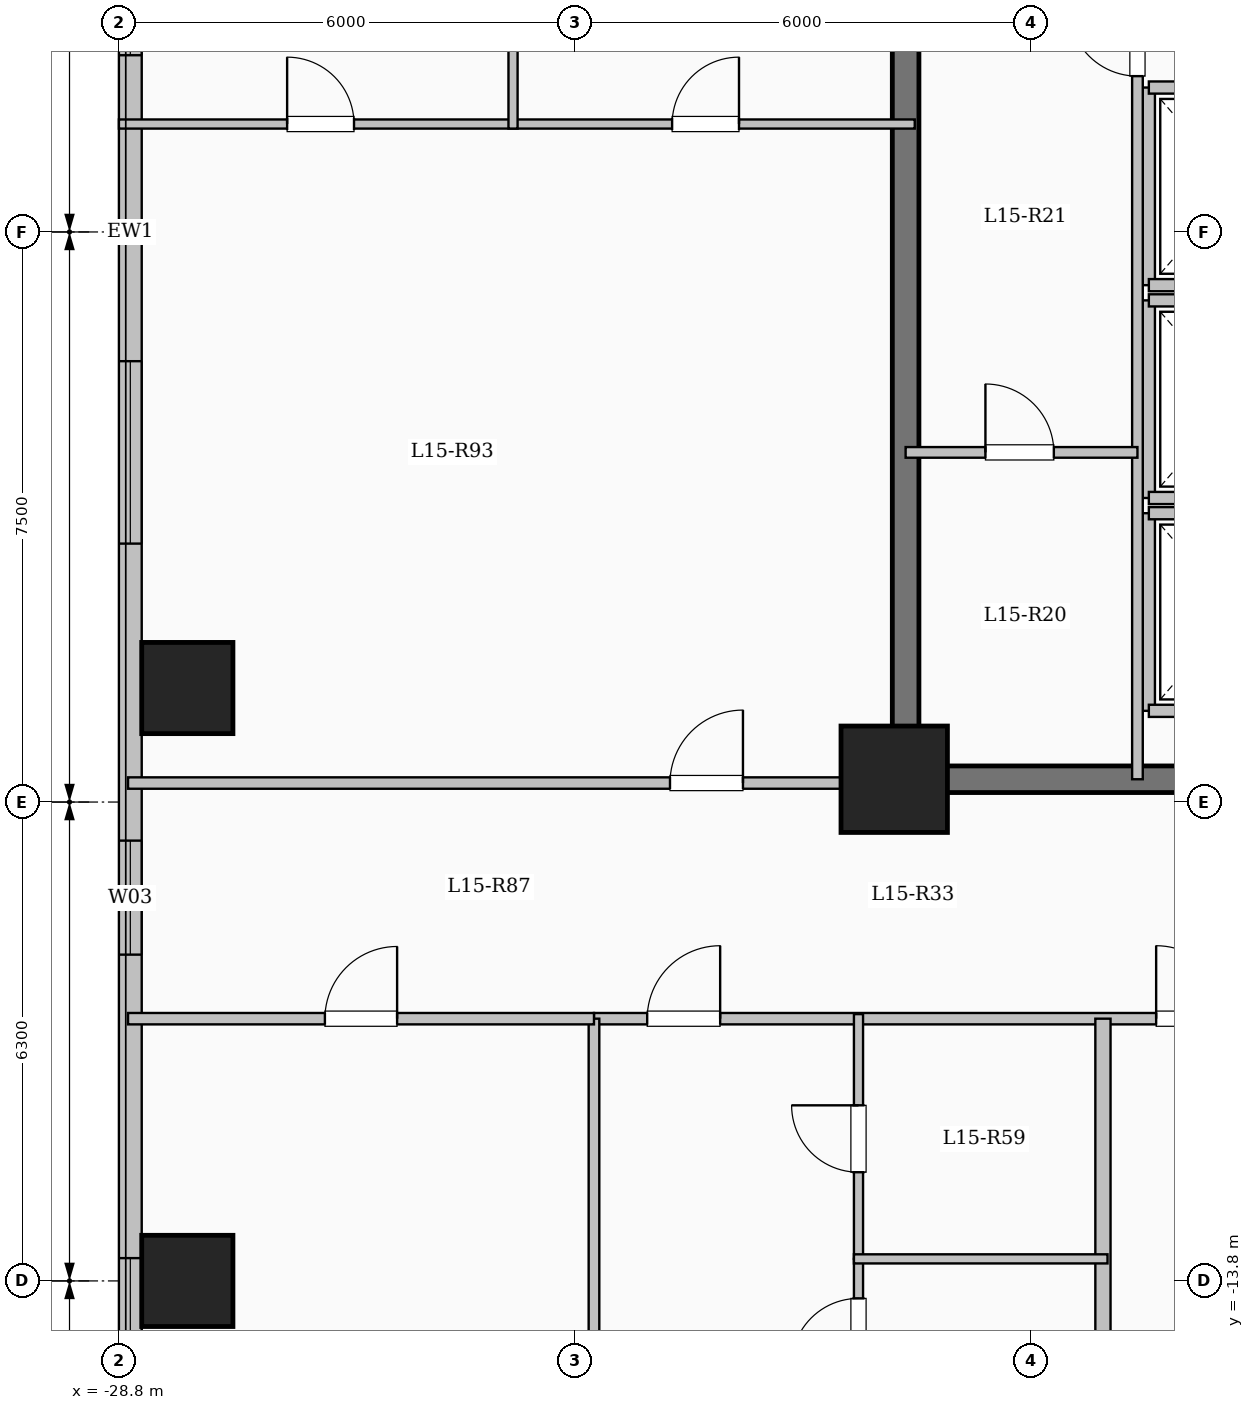
"""IFC4 building model, lengths in metres.
Left out: names, types, materials, properties, quantities, classifications, styles, units other than length and angle.
Written with IfcOpenShell. Run it as: python <this file> out.ifc"""

import sys

from ifc_helpers import new_model, si_unit, direction, frame, frame_2d, origin, origin_2d, place, context, subcontext, project, spatial, rectangle, extrude, element, fill, save


model = new_model("IFC4")
c1 = context("Model", 3, precision=1e-05, world=origin(), true_north=direction((0.0, 1.0)))
c2 = subcontext(c1, "Body", "Model", "MODEL_VIEW")
j1 = project(units=[si_unit("LENGTHUNIT", "METRE"), si_unit("PLANEANGLEUNIT", "RADIAN")], contexts=[c1])
p1 = place(None, origin())
s1 = spatial("IfcSite", under=j1, at=p1, CompositionType="ELEMENT")
p2 = place(p1, origin())
s2 = spatial("IfcBuilding", under=s1, at=p2, CompositionType="ELEMENT")
p3 = place(p2, frame((0.0, 0.0, 57.5)))
s3 = spatial("IfcBuildingStorey", under=s2, at=p3, CompositionType="ELEMENT", Elevation=57.5)
p4 = place(p3, frame((-18.6, -7.2, 0.0), z_axis=(0.0, 0.0, 1.0), x_axis=(1.0, 0.0, 0.0)))
e1 = element("IfcColumn", 1, at=p4, inside=s3, PredefinedType="COLUMN", context=c2, shape_type="SweptSolid", body=[
    extrude(rectangle(XDim=1.4, YDim=1.4, at=origin_2d()), origin(), (0.0, 0.0, 1.0), 3.35),
])
for number, where, z_axis, x_axis in (
    (2, (-27.9, -13.8, 0.0), (0.0, 0.0, 1.0), (1.0, 0.0, 0.0)),
    (3, (-27.9, -6.0, 0.0), (0.0, 0.0, 1.0), (1.0, 0.0, 0.0)),
):
    element("IfcColumn", number, at=place(p3, frame(where, z_axis=z_axis, x_axis=x_axis)), inside=s3, PredefinedType="COLUMN", context=c2, shape_type="SweptSolid", body=[
        extrude(rectangle(XDim=1.2, YDim=1.2, at=origin_2d()), origin(), (0.0, 0.0, 1.0), 3.35),
    ])
p5 = place(p3, frame((-28.65, -19.05, 0.0), z_axis=(0.0, 0.0, 1.0), x_axis=(0.0, 1.0, 0.0)))
e4 = element("IfcWall", 4, at=p5, inside=s3, PredefinedType="SOLIDWALL", context=c2, shape_type="SweptSolid", body=[
    extrude(rectangle(XDim=38.1, YDim=0.3, at=frame_2d((19.05, 0.0))), origin(), (0.0, 0.0, 1.0), 3.1),
])
p6 = place(p5, frame((3.15, 0.0, 0.9)))
e5 = element("IfcOpeningElement", 5, at=p6, cuts=e4, PredefinedType="OPENING", context=c2, shape_type="SweptSolid", body=[
    extrude(rectangle(XDim=2.4, YDim=1.8, at=frame_2d((1.2, 0.9))), frame((0.0, 0.16, 0.0), z_axis=(0.0, -1.0, 0.0), x_axis=(1.0, 0.0, 0.0)), (0.0, 0.0, 1.0), 0.32),
])
p7 = place(p5, frame((9.542, 0.0, 0.9)))
e6 = element("IfcOpeningElement", 6, at=p7, cuts=e4, PredefinedType="OPENING", context=c2, shape_type="SweptSolid", body=[
    extrude(rectangle(XDim=1.5, YDim=1.65, at=frame_2d((0.75, 0.825))), frame((0.0, 0.16, 0.0), z_axis=(0.0, -1.0, 0.0), x_axis=(1.0, 0.0, 0.0)), (0.0, 0.0, 1.0), 0.32),
])
p8 = place(p5, frame((14.95, 0.0, 0.9)))
e7 = element("IfcOpeningElement", 7, at=p8, cuts=e4, PredefinedType="OPENING", context=c2, shape_type="SweptSolid", body=[
    extrude(rectangle(XDim=2.4, YDim=1.8, at=frame_2d((1.2, 0.9))), frame((0.0, 0.16, 0.0), z_axis=(0.0, -1.0, 0.0), x_axis=(1.0, 0.0, 0.0)), (0.0, 0.0, 1.0), 0.32),
])
p9 = place(p5, frame((21.375, 0.0, 0.9)))
e8 = element("IfcOpeningElement", 8, at=p9, cuts=e4, PredefinedType="OPENING", context=c2, shape_type="SweptSolid", body=[
    extrude(rectangle(XDim=1.8, YDim=1.65, at=frame_2d((0.9, 0.825))), frame((0.0, 0.16, 0.0), z_axis=(0.0, -1.0, 0.0), x_axis=(1.0, 0.0, 0.0)), (0.0, 0.0, 1.0), 0.32),
])
p10 = place(p5, frame((25.925, 0.0, 0.9)))
e9 = element("IfcOpeningElement", 9, at=p10, cuts=e4, PredefinedType="OPENING", context=c2, shape_type="SweptSolid", body=[
    extrude(rectangle(XDim=2.0, YDim=1.7, at=frame_2d((1.0, 0.85))), frame((0.0, 0.16, 0.0), z_axis=(0.0, -1.0, 0.0), x_axis=(1.0, 0.0, 0.0)), (0.0, 0.0, 1.0), 0.32),
])
p11 = place(p5, frame((30.175, 0.0, 0.95)))
e10 = element("IfcOpeningElement", 10, at=p11, cuts=e4, PredefinedType="OPENING", context=c2, shape_type="SweptSolid", body=[
    extrude(rectangle(XDim=1.0, YDim=1.5, at=frame_2d((0.5, 0.75))), frame((0.0, 0.16, 0.0), z_axis=(0.0, -1.0, 0.0), x_axis=(1.0, 0.0, 0.0)), (0.0, 0.0, 1.0), 0.32),
])
p12 = place(p5, frame((33.85, 0.0, 0.9)))
e11 = element("IfcOpeningElement", 11, at=p12, cuts=e4, PredefinedType="OPENING", context=c2, shape_type="SweptSolid", body=[
    extrude(rectangle(XDim=2.0, YDim=1.7, at=frame_2d((1.0, 0.85))), frame((0.0, 0.16, 0.0), z_axis=(0.0, -1.0, 0.0), x_axis=(1.0, 0.0, 0.0)), (0.0, 0.0, 1.0), 0.32),
])
p13 = place(p3, frame((-15.25, -6.3, 0.0), z_axis=(0.0, 0.0, 1.0), x_axis=(0.0, 1.0, 0.0)))
e12 = element("IfcWall", 12, at=p13, inside=s3, PredefinedType="SOLIDWALL", context=c2, shape_type="SweptSolid", body=[
    extrude(rectangle(XDim=2.6, YDim=0.16, at=frame_2d((1.3, 0.0))), origin(), (0.0, 0.0, 1.0), 3.1),
])
for number, where, z_axis, x_axis in (
    (13, (-15.25, -6.3, 0.0), (0.0, 0.0, 1.0), (1.0, 0.0, 0.0)),
    (14, (-15.25, -3.7, 0.0), (0.0, 0.0, 1.0), (1.0, 0.0, 0.0)),
):
    element("IfcWall", number, at=place(p3, frame(where, z_axis=z_axis, x_axis=x_axis)), inside=s3, PredefinedType="SOLIDWALL", context=c2, shape_type="SweptSolid", body=[
        extrude(rectangle(XDim=2.3, YDim=0.16, at=frame_2d((1.15, 0.0))), origin(), (0.0, 0.0, 1.0), 3.1),
    ])
p14 = place(p3, frame((-15.25, -3.5, 0.0), z_axis=(0.0, 0.0, 1.0), x_axis=(0.0, 1.0, 0.0)))
e15 = element("IfcWall", 15, at=p14, inside=s3, PredefinedType="SOLIDWALL", context=c2, shape_type="SweptSolid", body=[
    extrude(rectangle(XDim=2.6, YDim=0.16, at=frame_2d((1.3, 0.0))), origin(), (0.0, 0.0, 1.0), 3.1),
])
for number, where, z_axis, x_axis in (
    (16, (-15.25, -3.5, 0.0), (0.0, 0.0, 1.0), (1.0, 0.0, 0.0)),
    (17, (-15.25, -0.9, 0.0), (0.0, 0.0, 1.0), (1.0, 0.0, 0.0)),
):
    element("IfcWall", number, at=place(p3, frame(where, z_axis=z_axis, x_axis=x_axis)), inside=s3, PredefinedType="SOLIDWALL", context=c2, shape_type="SweptSolid", body=[
        extrude(rectangle(XDim=2.3, YDim=0.16, at=frame_2d((1.15, 0.0))), origin(), (0.0, 0.0, 1.0), 3.1),
    ])
p15 = place(p3, frame((-15.25, -0.7, 0.0), z_axis=(0.0, 0.0, 1.0), x_axis=(0.0, 1.0, 0.0)))
e18 = element("IfcWall", 18, at=p15, inside=s3, PredefinedType="SOLIDWALL", context=c2, shape_type="SweptSolid", body=[
    extrude(rectangle(XDim=2.6, YDim=0.16, at=frame_2d((1.3, 0.0))), origin(), (0.0, 0.0, 1.0), 3.1),
])
for number, where, z_axis, x_axis in (
    (19, (-15.25, -0.7, 0.0), (0.0, 0.0, 1.0), (1.0, 0.0, 0.0)),
    (20, (-15.25, 1.9, 0.0), (0.0, 0.0, 1.0), (1.0, 0.0, 0.0)),
):
    element("IfcWall", number, at=place(p3, frame(where, z_axis=z_axis, x_axis=x_axis)), inside=s3, PredefinedType="SOLIDWALL", context=c2, shape_type="SweptSolid", body=[
        extrude(rectangle(XDim=2.3, YDim=0.16, at=frame_2d((1.15, 0.0))), origin(), (0.0, 0.0, 1.0), 3.1),
    ])
p16 = place(p3, frame((-18.45, -7.375, 0.0), z_axis=(0.0, 0.0, 1.0), x_axis=(0.0, 1.0, 0.0)))
e21 = element("IfcWall", 21, at=p16, inside=s3, PredefinedType="SHEAR", context=c2, shape_type="SweptSolid", body=[
    extrude(rectangle(XDim=14.05, YDim=0.35, at=frame_2d((7.025, 0.0))), origin(), (0.0, 0.0, 1.0), 3.35),
])
p17 = place(p3, frame((-18.625, -7.2, 0.0), z_axis=(0.0, 0.0, 1.0), x_axis=(1.0, 0.0, 0.0)))
e22 = element("IfcWall", 22, at=p17, inside=s3, PredefinedType="SHEAR", context=c2, shape_type="SweptSolid", body=[
    extrude(rectangle(XDim=8.55, YDim=0.35, at=frame_2d((4.275, 0.0))), origin(), (0.0, 0.0, 1.0), 3.35),
])
p18 = place(p3, frame((-15.4, -7.2, 0.0), z_axis=(0.0, 0.0, 1.0), x_axis=(0.0, 1.0, 0.0)))
e23 = element("IfcWall", 23, at=p18, inside=s3, PredefinedType="PARTITIONING", context=c2, shape_type="SweptSolid", body=[
    extrude(rectangle(XDim=10.45, YDim=0.14, at=frame_2d((5.225, 0.0))), origin(), (0.0, 0.0, 1.0), 3.1),
])
p19 = place(p18, frame((9.25, 0.0, 0.0)))
e24 = element("IfcOpeningElement", 24, at=p19, cuts=e23, PredefinedType="OPENING", context=c2, shape_type="SweptSolid", body=[
    extrude(rectangle(XDim=0.9, YDim=2.08, at=frame_2d((0.45, 1.04))), frame((0.0, 0.08, 0.0), z_axis=(0.0, -1.0, 0.0), x_axis=(1.0, 0.0, 0.0)), (0.0, 0.0, 1.0), 0.16),
])
p20 = place(p3, frame((-18.45, -2.9, 0.0), z_axis=(0.0, 0.0, 1.0), x_axis=(1.0, 0.0, 0.0)))
e25 = element("IfcWall", 25, at=p20, inside=s3, PredefinedType="PARTITIONING", context=c2, shape_type="SweptSolid", body=[
    extrude(rectangle(XDim=3.05, YDim=0.14, at=frame_2d((1.525, 0.0))), origin(), (0.0, 0.0, 1.0), 3.1),
])
p21 = place(p20, frame((1.05, 0.0, 0.0)))
e26 = element("IfcOpeningElement", 26, at=p21, cuts=e25, PredefinedType="OPENING", context=c2, shape_type="SweptSolid", body=[
    extrude(rectangle(XDim=0.9, YDim=2.08, at=frame_2d((0.45, 1.04))), frame((0.0, 0.08, 0.0), z_axis=(0.0, -1.0, 0.0), x_axis=(1.0, 0.0, 0.0)), (0.0, 0.0, 1.0), 0.16),
])
p22 = place(p3, frame((-22.55, -10.35, 0.0), z_axis=(0.0, 0.0, 1.0), x_axis=(1.0, 0.0, 0.0)))
e27 = element("IfcWall", 27, at=p22, inside=s3, PredefinedType="PARTITIONING", context=c2, shape_type="SweptSolid", body=[
    extrude(rectangle(XDim=14.0, YDim=0.15, at=frame_2d((7.0, 0.0))), origin(), (0.0, 0.0, 1.0), 3.1),
])
p23 = place(p22, frame((0.7, 0.0, 0.0)))
e28 = element("IfcOpeningElement", 28, at=p23, cuts=e27, PredefinedType="OPENING", context=c2, shape_type="SweptSolid", body=[
    extrude(rectangle(XDim=0.96, YDim=2.15, at=frame_2d((0.48, 1.075))), frame((0.0, 0.085, 0.0), z_axis=(0.0, -1.0, 0.0), x_axis=(1.0, 0.0, 0.0)), (0.0, 0.0, 1.0), 0.17),
])
p24 = place(p22, frame((7.396, 0.0, 0.0)))
e29 = element("IfcOpeningElement", 29, at=p24, cuts=e27, PredefinedType="OPENING", context=c2, shape_type="SweptSolid", body=[
    extrude(rectangle(XDim=0.96, YDim=2.15, at=frame_2d((0.48, 1.075))), frame((0.0, 0.085, 0.0), z_axis=(0.0, -1.0, 0.0), x_axis=(1.0, 0.0, 0.0)), (0.0, 0.0, 1.0), 0.17),
])
p25 = place(p3, frame((-15.854, -23.6, 0.0), z_axis=(0.0, 0.0, 1.0), x_axis=(0.0, 1.0, 0.0)))
e30 = element("IfcWall", 30, at=p25, inside=s3, PredefinedType="SOLIDWALL", context=c2, shape_type="SweptSolid", body=[
    extrude(rectangle(XDim=13.25, YDim=0.2, at=frame_2d((6.625, 0.0))), origin(), (0.0, 0.0, 1.0), 3.1),
])
p26 = place(p3, frame((-19.07, -23.6, 0.0), z_axis=(0.0, 0.0, 1.0), x_axis=(0.0, 1.0, 0.0)))
e31 = element("IfcWall", 31, at=p26, inside=s3, PredefinedType="PARTITIONING", context=c2, shape_type="SweptSolid", body=[
    extrude(rectangle(XDim=10.09, YDim=0.12, at=frame_2d((5.045, 0.0))), origin(), (0.0, 0.0, 1.0), 3.1),
])
p27 = place(p26, frame((8.69, 0.0, 0.0)))
e32 = element("IfcOpeningElement", 32, at=p27, cuts=e31, PredefinedType="OPENING", context=c2, shape_type="SweptSolid", body=[
    extrude(rectangle(XDim=0.88, YDim=2.1, at=frame_2d((0.44, 1.05))), frame((0.0, 0.07, 0.0), z_axis=(0.0, -1.0, 0.0), x_axis=(1.0, 0.0, 0.0)), (0.0, 0.0, 1.0), 0.14),
])
p28 = place(p3, frame((-19.07, -13.51, 0.0), z_axis=(0.0, 0.0, 1.0), x_axis=(0.0, 1.0, 0.0)))
e33 = element("IfcWall", 33, at=p28, inside=s3, PredefinedType="PARTITIONING", context=c2, shape_type="SweptSolid", body=[
    extrude(rectangle(XDim=3.22, YDim=0.12, at=frame_2d((1.61, 0.0))), origin(), (0.0, 0.0, 1.0), 3.1),
])
p29 = place(p28, frame((1.14, 0.0, 0.0)))
e34 = element("IfcOpeningElement", 34, at=p29, cuts=e33, PredefinedType="OPENING", context=c2, shape_type="SweptSolid", body=[
    extrude(rectangle(XDim=0.88, YDim=2.1, at=frame_2d((0.44, 1.05))), frame((0.0, 0.07, 0.0), z_axis=(0.0, -1.0, 0.0), x_axis=(1.0, 0.0, 0.0)), (0.0, 0.0, 1.0), 0.14),
])
p30 = place(p3, frame((-19.13, -13.51, 0.0), z_axis=(0.0, 0.0, 1.0), x_axis=(1.0, 0.0, 0.0)))
e35 = element("IfcWall", 35, at=p30, inside=s3, PredefinedType="PARTITIONING", context=c2, shape_type="SweptSolid", body=[
    extrude(rectangle(XDim=3.336, YDim=0.12, at=frame_2d((1.668, 0.0))), origin(), (0.0, 0.0, 1.0), 3.1),
])
p31 = place(p3, frame((-28.68, -7.25, 0.0), z_axis=(0.0, 0.0, 1.0), x_axis=(1.0, 0.0, 0.0)))
e36 = element("IfcWall", 36, at=p31, inside=s3, PredefinedType="PARTITIONING", context=c2, shape_type="SweptSolid", body=[
    extrude(rectangle(XDim=10.23, YDim=0.15, at=frame_2d((5.115, 0.0))), origin(), (0.0, 0.0, 1.0), 3.1),
])
p32 = place(p31, frame((7.13, 0.0, 0.0)))
e37 = element("IfcOpeningElement", 37, at=p32, cuts=e36, PredefinedType="OPENING", context=c2, shape_type="SweptSolid", body=[
    extrude(rectangle(XDim=0.96, YDim=2.15, at=frame_2d((0.48, 1.075))), frame((0.0, 0.085, 0.0), z_axis=(0.0, -1.0, 0.0), x_axis=(1.0, 0.0, 0.0)), (0.0, 0.0, 1.0), 0.17),
])
p33 = place(p3, frame((-22.55, -19.05, 0.0), z_axis=(0.0, 0.0, 1.0), x_axis=(0.0, 1.0, 0.0)))
e38 = element("IfcWall", 38, at=p33, inside=s3, PredefinedType="PARTITIONING", context=c2, shape_type="SweptSolid", body=[
    extrude(rectangle(XDim=8.7, YDim=0.14, at=frame_2d((4.35, 0.0))), origin(), (0.0, 0.0, 1.0), 3.1),
])
p34 = place(p3, frame((-28.68, -10.35, 0.0), z_axis=(0.0, 0.0, 1.0), x_axis=(1.0, 0.0, 0.0)))
e39 = element("IfcWall", 39, at=p34, inside=s3, PredefinedType="PARTITIONING", context=c2, shape_type="SweptSolid", body=[
    extrude(rectangle(XDim=6.13, YDim=0.15, at=frame_2d((3.065, 0.0))), origin(), (0.0, 0.0, 1.0), 3.1),
])
p35 = place(p34, frame((2.59, 0.0, 0.0)))
e40 = element("IfcOpeningElement", 40, at=p35, cuts=e39, PredefinedType="OPENING", context=c2, shape_type="SweptSolid", body=[
    extrude(rectangle(XDim=0.95, YDim=2.15, at=frame_2d((0.475, 1.075))), frame((0.0, 0.085, 0.0), z_axis=(0.0, -1.0, 0.0), x_axis=(1.0, 0.0, 0.0)), (0.0, 0.0, 1.0), 0.17),
])
p36 = place(p3, frame((-28.8, 1.42, 0.0), z_axis=(0.0, 0.0, 1.0), x_axis=(1.0, 0.0, 0.0)))
e41 = element("IfcWall", 41, at=p36, inside=s3, PredefinedType="PARTITIONING", context=c2, shape_type="SweptSolid", body=[
    extrude(rectangle(XDim=10.47, YDim=0.12, at=frame_2d((5.235, 0.0))), origin(), (0.0, 0.0, 1.0), 3.1),
])
p37 = place(p36, frame((2.213, 0.0, 0.0)))
e42 = element("IfcOpeningElement", 42, at=p37, cuts=e41, PredefinedType="OPENING", context=c2, shape_type="SweptSolid", body=[
    extrude(rectangle(XDim=0.88, YDim=2.1, at=frame_2d((0.44, 1.05))), frame((0.0, 0.07, 0.0), z_axis=(0.0, -1.0, 0.0), x_axis=(1.0, 0.0, 0.0)), (0.0, 0.0, 1.0), 0.14),
])
p38 = place(p36, frame((7.278, 0.0, 0.0)))
e43 = element("IfcOpeningElement", 43, at=p38, cuts=e41, PredefinedType="OPENING", context=c2, shape_type="SweptSolid", body=[
    extrude(rectangle(XDim=0.88, YDim=2.1, at=frame_2d((0.44, 1.05))), frame((0.0, 0.07, 0.0), z_axis=(0.0, -1.0, 0.0), x_axis=(1.0, 0.0, 0.0)), (0.0, 0.0, 1.0), 0.14),
])
p39 = place(p3, frame((-23.615, 1.36, 0.0), z_axis=(0.0, 0.0, 1.0), x_axis=(0.0, 1.0, 0.0)))
e44 = element("IfcWall", 44, at=p39, inside=s3, PredefinedType="PARTITIONING", context=c2, shape_type="SweptSolid", body=[
    extrude(rectangle(XDim=3.58, YDim=0.12, at=frame_2d((1.79, 0.0))), origin(), (0.0, 0.0, 1.0), 3.1),
])
p40 = place(p6, origin())
e45 = element("IfcWindow", 45, at=p40, inside=s3, PartitioningType="SINGLE_PANEL", PredefinedType="WINDOW", context=c2, shape_type="SweptSolid", body=[
    extrude(rectangle(XDim=2.4, YDim=1.8, at=frame_2d((1.2, 0.9))), frame((0.0, 0.03, 0.0), z_axis=(0.0, -1.0, 0.0), x_axis=(1.0, 0.0, 0.0)), (0.0, 0.0, 1.0), 0.06),
])
fill(e5, e45)
p41 = place(p7, origin())
e46 = element("IfcWindow", 46, at=p41, inside=s3, PartitioningType="SINGLE_PANEL", PredefinedType="WINDOW", context=c2, shape_type="SweptSolid", body=[
    extrude(rectangle(XDim=1.5, YDim=1.65, at=frame_2d((0.75, 0.825))), frame((0.0, 0.03, 0.0), z_axis=(0.0, -1.0, 0.0), x_axis=(1.0, 0.0, 0.0)), (0.0, 0.0, 1.0), 0.06),
])
fill(e6, e46)
p42 = place(p8, origin())
e47 = element("IfcWindow", 47, at=p42, inside=s3, PartitioningType="SINGLE_PANEL", PredefinedType="WINDOW", context=c2, shape_type="SweptSolid", body=[
    extrude(rectangle(XDim=2.4, YDim=1.8, at=frame_2d((1.2, 0.9))), frame((0.0, 0.03, 0.0), z_axis=(0.0, -1.0, 0.0), x_axis=(1.0, 0.0, 0.0)), (0.0, 0.0, 1.0), 0.06),
])
fill(e7, e47)
p43 = place(p9, origin())
e48 = element("IfcWindow", 48, at=p43, inside=s3, PartitioningType="SINGLE_PANEL", PredefinedType="WINDOW", context=c2, shape_type="SweptSolid", body=[
    extrude(rectangle(XDim=1.8, YDim=1.65, at=frame_2d((0.9, 0.825))), frame((0.0, 0.03, 0.0), z_axis=(0.0, -1.0, 0.0), x_axis=(1.0, 0.0, 0.0)), (0.0, 0.0, 1.0), 0.06),
])
fill(e8, e48)
p44 = place(p19, origin())
e49 = element("IfcDoor", 49, at=p44, inside=s3, OperationType="SINGLE_SWING_RIGHT", PredefinedType="DOOR", context=c2, shape_type="SweptSolid", body=[
    extrude(rectangle(XDim=0.9, YDim=2.08, at=frame_2d((0.45, 1.04))), frame((0.0, 0.025, 0.0), z_axis=(0.0, -1.0, 0.0), x_axis=(1.0, 0.0, 0.0)), (0.0, 0.0, 1.0), 0.05),
])
fill(e24, e49)
p45 = place(p21, origin())
e50 = element("IfcDoor", 50, at=p45, inside=s3, OperationType="SINGLE_SWING_LEFT", PredefinedType="DOOR", context=c2, shape_type="SweptSolid", body=[
    extrude(rectangle(XDim=0.9, YDim=2.08, at=frame_2d((0.45, 1.04))), frame((0.0, 0.025, 0.0), z_axis=(0.0, -1.0, 0.0), x_axis=(1.0, 0.0, 0.0)), (0.0, 0.0, 1.0), 0.05),
])
fill(e26, e50)
p46 = place(p23, origin())
e51 = element("IfcDoor", 51, at=p46, inside=s3, OperationType="SINGLE_SWING_RIGHT", PredefinedType="DOOR", context=c2, shape_type="SweptSolid", body=[
    extrude(rectangle(XDim=0.96, YDim=2.15, at=frame_2d((0.48, 1.075))), frame((0.0, 0.025, 0.0), z_axis=(0.0, -1.0, 0.0), x_axis=(1.0, 0.0, 0.0)), (0.0, 0.0, 1.0), 0.05),
])
fill(e28, e51)
p47 = place(p27, origin())
e52 = element("IfcDoor", 52, at=p47, inside=s3, OperationType="SINGLE_SWING_LEFT", PredefinedType="DOOR", context=c2, shape_type="SweptSolid", body=[
    extrude(rectangle(XDim=0.88, YDim=2.1, at=frame_2d((0.44, 1.05))), frame((0.0, 0.025, 0.0), z_axis=(0.0, -1.0, 0.0), x_axis=(1.0, 0.0, 0.0)), (0.0, 0.0, 1.0), 0.05),
])
fill(e32, e52)
p48 = place(p29, origin())
e53 = element("IfcDoor", 53, at=p48, inside=s3, OperationType="SINGLE_SWING_RIGHT", PredefinedType="DOOR", context=c2, shape_type="SweptSolid", body=[
    extrude(rectangle(XDim=0.88, YDim=2.1, at=frame_2d((0.44, 1.05))), frame((0.0, 0.025, 0.0), z_axis=(0.0, -1.0, 0.0), x_axis=(1.0, 0.0, 0.0)), (0.0, 0.0, 1.0), 0.05),
])
fill(e34, e53)
p49 = place(p24, origin())
e54 = element("IfcDoor", 54, at=p49, inside=s3, OperationType="SINGLE_SWING_LEFT", PredefinedType="DOOR", context=c2, shape_type="SweptSolid", body=[
    extrude(rectangle(XDim=0.96, YDim=2.15, at=frame_2d((0.48, 1.075))), frame((0.0, 0.025, 0.0), z_axis=(0.0, -1.0, 0.0), x_axis=(1.0, 0.0, 0.0)), (0.0, 0.0, 1.0), 0.05),
])
fill(e29, e54)
p50 = place(p35, origin())
e55 = element("IfcDoor", 55, at=p50, inside=s3, OperationType="SINGLE_SWING_RIGHT", PredefinedType="DOOR", context=c2, shape_type="SweptSolid", body=[
    extrude(rectangle(XDim=0.95, YDim=2.15, at=frame_2d((0.475, 1.075))), frame((0.0, 0.025, 0.0), z_axis=(0.0, -1.0, 0.0), x_axis=(1.0, 0.0, 0.0)), (0.0, 0.0, 1.0), 0.05),
])
fill(e40, e55)
p51 = place(p32, origin())
e56 = element("IfcDoor", 56, at=p51, inside=s3, OperationType="SINGLE_SWING_RIGHT", PredefinedType="DOOR", context=c2, shape_type="SweptSolid", body=[
    extrude(rectangle(XDim=0.96, YDim=2.15, at=frame_2d((0.48, 1.075))), frame((0.0, 0.025, 0.0), z_axis=(0.0, -1.0, 0.0), x_axis=(1.0, 0.0, 0.0)), (0.0, 0.0, 1.0), 0.05),
])
fill(e37, e56)
p52 = place(p37, origin())
e57 = element("IfcDoor", 57, at=p52, inside=s3, OperationType="SINGLE_SWING_LEFT", PredefinedType="DOOR", context=c2, shape_type="SweptSolid", body=[
    extrude(rectangle(XDim=0.88, YDim=2.1, at=frame_2d((0.44, 1.05))), frame((0.0, 0.025, 0.0), z_axis=(0.0, -1.0, 0.0), x_axis=(1.0, 0.0, 0.0)), (0.0, 0.0, 1.0), 0.05),
])
fill(e42, e57)
p53 = place(p38, origin())
e58 = element("IfcDoor", 58, at=p53, inside=s3, OperationType="SINGLE_SWING_RIGHT", PredefinedType="DOOR", context=c2, shape_type="SweptSolid", body=[
    extrude(rectangle(XDim=0.88, YDim=2.1, at=frame_2d((0.44, 1.05))), frame((0.0, 0.025, 0.0), z_axis=(0.0, -1.0, 0.0), x_axis=(1.0, 0.0, 0.0)), (0.0, 0.0, 1.0), 0.05),
])
fill(e43, e58)
save(model, sys.argv[1])
